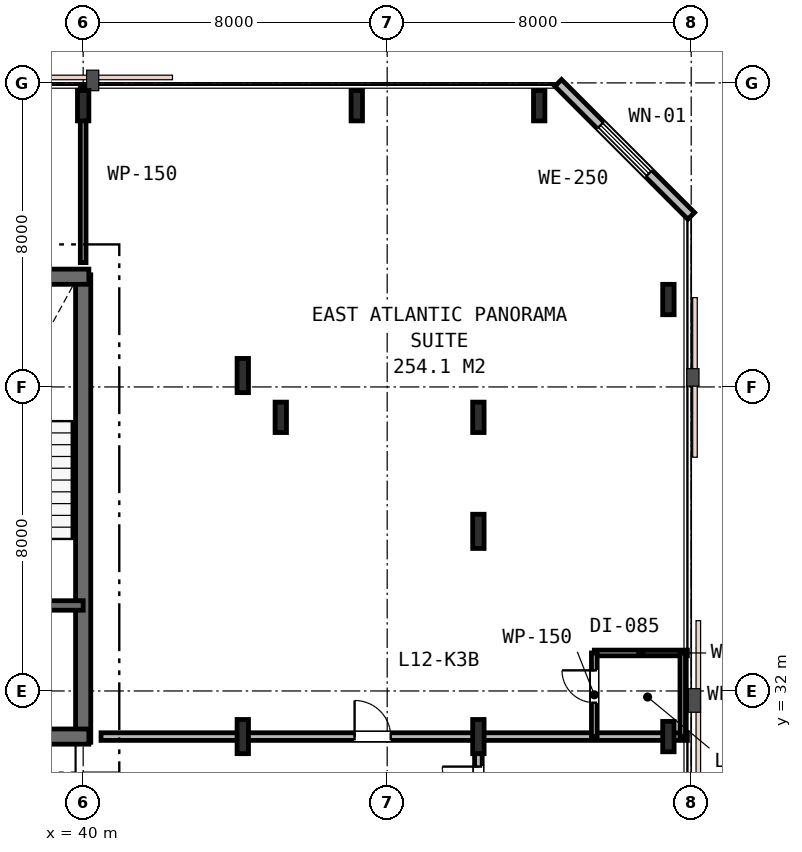
"""IFC4 building model, lengths in metres.
Left out: names, types, materials, properties, quantities, classifications, styles, units other than length and angle.
Written with IfcOpenShell. Run it as: python <this file> out.ifc"""

import sys

from ifc_helpers import new_model, si_unit, direction, frame, frame_2d, origin, origin_2d, place, context, subcontext, project, spatial, rectangle, i_section, extrude, element, fill, save


model = new_model("IFC4")
c1 = context("Model", 3, precision=1e-05, world=origin(), true_north=direction((0.0, 1.0)))
c2 = subcontext(c1, "Body", "Model", "MODEL_VIEW")
j1 = project(units=[si_unit("LENGTHUNIT", "METRE"), si_unit("PLANEANGLEUNIT", "RADIAN")], contexts=[c1])
p1 = place(None, origin())
s1 = spatial("IfcSite", under=j1, at=p1, CompositionType="ELEMENT")
p2 = place(p1, origin())
s2 = spatial("IfcBuilding", under=s1, at=p2, CompositionType="ELEMENT")
p3 = place(p2, frame((0.0, 0.0, 51.0)))
s3 = spatial("IfcBuildingStorey", under=s2, at=p3, CompositionType="ELEMENT", Elevation=51.0)
p4 = place(p3, frame((40.0, 30.65, 0.0), z_axis=(0.0, 0.0, 1.0), x_axis=(0.0, 1.0, 0.0)))
e1 = element("IfcWall", 1, at=p4, inside=s3, PredefinedType="SHEAR", context=c2, shape_type="SweptSolid", body=[
    extrude(rectangle(XDim=12.3, YDim=0.4, at=frame_2d((6.15, 0.0))), origin(), (0.0, 0.0, 1.0), 3.6),
])
p5 = place(p3, frame((15.85, 42.9, 0.0), z_axis=(0.0, 0.0, 1.0), x_axis=(1.0, 0.0, 0.0)))
e2 = element("IfcWall", 2, at=p5, inside=s3, PredefinedType="SHEAR", context=c2, shape_type="SweptSolid", body=[
    extrude(rectangle(XDim=24.3, YDim=0.4, at=frame_2d((12.15, 0.0))), origin(), (0.0, 0.0, 1.0), 3.6),
])
p6 = place(p3, frame((28.95, 30.8, 0.0), z_axis=(0.0, 0.0, 1.0), x_axis=(1.0, 0.0, 0.0)))
e3 = element("IfcWall", 3, at=p6, inside=s3, PredefinedType="SHEAR", context=c2, shape_type="SweptSolid", body=[
    extrude(rectangle(XDim=11.2, YDim=0.4, at=frame_2d((5.6, 0.0))), origin(), (0.0, 0.0, 1.0), 3.6),
])
p7 = place(p6, frame((7.65, 0.0, 0.0)))
e4 = element("IfcOpeningElement", 4, at=p7, cuts=e3, PredefinedType="OPENING", context=c2, shape_type="SweptSolid", body=[
    extrude(rectangle(XDim=1.1, YDim=2.15, at=frame_2d((0.55, 1.075))), frame((0.0, 0.21, 0.0), z_axis=(0.0, -1.0, 0.0), x_axis=(1.0, 0.0, 0.0)), (0.0, 0.0, 1.0), 0.42),
])
p8 = place(p3, frame((33.95, 34.25, 0.0), z_axis=(0.0, 0.0, 1.0), x_axis=(1.0, 0.0, 0.0)))
e5 = element("IfcWall", 5, at=p8, inside=s3, PredefinedType="SHEAR", context=c2, shape_type="SweptSolid", body=[
    extrude(rectangle(XDim=6.05, YDim=0.25, at=frame_2d((3.025, 0.0))), origin(), (0.0, 0.0, 1.0), 3.6),
])
p9 = place(p8, frame((3.7, 0.0, 0.0)))
e6 = element("IfcOpeningElement", 6, at=p9, cuts=e5, PredefinedType="OPENING", context=c2, shape_type="SweptSolid", body=[
    extrude(rectangle(XDim=1.0, YDim=2.15, at=frame_2d((0.5, 1.075))), frame((0.0, 0.135, 0.0), z_axis=(0.0, -1.0, 0.0), x_axis=(1.0, 0.0, 0.0)), (0.0, 0.0, 1.0), 0.27),
])
p10 = place(p8, frame((0.55, 0.0, 0.0)))
e7 = element("IfcOpeningElement", 7, at=p10, cuts=e5, PredefinedType="OPENING", context=c2, shape_type="SweptSolid", body=[
    extrude(rectangle(XDim=1.1, YDim=2.15, at=frame_2d((0.55, 1.075))), frame((0.0, 0.135, 0.0), z_axis=(0.0, -1.0, 0.0), x_axis=(1.0, 0.0, 0.0)), (0.0, 0.0, 1.0), 0.27),
])
for number, where, z_axis, x_axis in (
    (8, (45.2, 39.2, 0.0), (0.0, 0.0, 1.0), (1.0, 0.0, 0.0)),
    (9, (40.0, 47.4, 0.0), (0.0, 0.0, 1.0), (1.0, 0.0, 0.0)),
    (10, (47.2, 47.4, 0.0), (0.0, 0.0, 1.0), (1.0, 0.0, 0.0)),
    (11, (50.4, 39.2, 0.0), (0.0, 0.0, 1.0), (1.0, 0.0, 0.0)),
    (12, (55.4, 30.8, 0.0), (0.0, 0.0, 1.0), (1.0, 0.0, 0.0)),
    (13, (55.4, 42.3, 0.0), (0.0, 0.0, 1.0), (1.0, 0.0, 0.0)),
    (14, (52.0, 47.4, 0.0), (0.0, 0.0, 1.0), (1.0, 0.0, 0.0)),
):
    element("IfcColumn", number, at=place(p3, frame(where, z_axis=z_axis, x_axis=x_axis)), inside=s3, PredefinedType="COLUMN", context=c2, shape_type="SweptSolid", body=[
        extrude(i_section(OverallWidth=0.3, OverallDepth=0.8, WebThickness=0.018, FlangeThickness=0.033, FilletRadius=0.03, at=origin_2d()), origin(), (0.0, 0.0, 1.0), 3.6),
    ])
for number, where, z_axis, x_axis in (
    (15, (44.2, 30.8, 0.0), (0.0, 0.0, 1.0), (1.0, 0.0, 0.0)),
    (16, (44.2, 40.3, 0.0), (0.0, 0.0, 1.0), (1.0, 0.0, 0.0)),
    (17, (50.4, 30.8, 0.0), (0.0, 0.0, 1.0), (1.0, 0.0, 0.0)),
    (18, (50.4, 36.2, 0.0), (0.0, 0.0, 1.0), (1.0, 0.0, 0.0)),
):
    element("IfcColumn", number, at=place(p3, frame(where, z_axis=z_axis, x_axis=x_axis)), inside=s3, PredefinedType="COLUMN", context=c2, shape_type="SweptSolid", body=[
        extrude(i_section(OverallWidth=0.3, OverallDepth=0.9, WebThickness=0.018, FlangeThickness=0.035, FilletRadius=0.03, at=origin_2d()), origin(), (0.0, 0.0, 1.0), 3.6),
    ])
p11 = place(p3, frame((56.0, 44.5, 0.0), z_axis=(0.0, 0.0, 1.0), x_axis=(-0.707106781187, 0.707106781187, 0.0)))
e19 = element("IfcWall", 19, at=p11, inside=s3, PredefinedType="STANDARD", context=c2, shape_type="SweptSolid", body=[
    extrude(rectangle(XDim=4.95, YDim=0.25, at=frame_2d((2.475, 0.0))), origin(), (0.0, 0.0, 1.0), 3.33),
])
p12 = place(p11, frame((1.575, 0.0, 0.75)))
e20 = element("IfcOpeningElement", 20, at=p12, cuts=e19, PredefinedType="OPENING", context=c2, shape_type="SweptSolid", body=[
    extrude(rectangle(XDim=1.8, YDim=1.85, at=frame_2d((0.9, 0.925))), frame((0.0, 0.135, 0.0), z_axis=(0.0, -1.0, 0.0), x_axis=(1.0, 0.0, 0.0)), (0.0, 0.0, 1.0), 0.27),
])
p13 = place(p3, frame((40.0, 43.27, 0.0), z_axis=(0.0, 0.0, 1.0), x_axis=(0.0, 1.0, 0.0)))
e21 = element("IfcWall", 21, at=p13, inside=s3, PredefinedType="PARTITIONING", context=c2, shape_type="SweptSolid", body=[
    extrude(rectangle(XDim=4.63, YDim=0.15, at=frame_2d((2.315, 0.0))), origin(), (0.0, 0.0, 1.0), 2.93),
])
p14 = place(p3, frame((40.47, 30.8, 0.0), z_axis=(0.0, 0.0, 1.0), x_axis=(1.0, 0.0, 0.0)))
e22 = element("IfcWall", 22, at=p14, inside=s3, PredefinedType="PARTITIONING", context=c2, shape_type="SweptSolid", body=[
    extrude(rectangle(XDim=15.43, YDim=0.2, at=frame_2d((7.715, 0.0))), origin(), (0.0, 0.0, 1.0), 2.82),
])
p15 = place(p14, frame((6.673, 0.0, 0.0)))
e23 = element("IfcOpeningElement", 23, at=p15, cuts=e22, PredefinedType="OPENING", context=c2, shape_type="SweptSolid", body=[
    extrude(rectangle(XDim=0.95, YDim=2.15, at=frame_2d((0.475, 1.075))), frame((0.0, 0.11, 0.0), z_axis=(0.0, -1.0, 0.0), x_axis=(1.0, 0.0, 0.0)), (0.0, 0.0, 1.0), 0.22),
])
p16 = place(p3, frame((53.45, 33.0, 0.0), z_axis=(0.0, 0.0, 1.0), x_axis=(1.0, 0.0, 0.0)))
e24 = element("IfcWall", 24, at=p16, inside=s3, PredefinedType="PARTITIONING", context=c2, shape_type="SweptSolid", body=[
    extrude(rectangle(XDim=2.45, YDim=0.15, at=frame_2d((1.225, 0.0))), origin(), (0.0, 0.0, 1.0), 2.93),
])
p17 = place(p3, frame((53.45, 30.8, 0.0), z_axis=(0.0, 0.0, 1.0), x_axis=(0.0, 1.0, 0.0)))
e25 = element("IfcWall", 25, at=p17, inside=s3, PredefinedType="PARTITIONING", context=c2, shape_type="SweptSolid", body=[
    extrude(rectangle(XDim=2.2, YDim=0.15, at=frame_2d((1.1, 0.0))), origin(), (0.0, 0.0, 1.0), 2.82),
])
p18 = place(p17, frame((0.892, 0.0, 0.0)))
e26 = element("IfcOpeningElement", 26, at=p18, cuts=e25, PredefinedType="OPENING", context=c2, shape_type="SweptSolid", body=[
    extrude(rectangle(XDim=0.85, YDim=2.15, at=frame_2d((0.425, 1.075))), frame((0.0, 0.085, 0.0), z_axis=(0.0, -1.0, 0.0), x_axis=(1.0, 0.0, 0.0)), (0.0, 0.0, 1.0), 0.17),
])
p19 = place(p3, frame((55.78, 33.0, 0.0), z_axis=(0.0, 0.0, 1.0), x_axis=(0.0, -1.0, 0.0)))
e27 = element("IfcWall", 27, at=p19, inside=s3, PredefinedType="PARTITIONING", context=c2, shape_type="SweptSolid", body=[
    extrude(rectangle(XDim=2.2, YDim=0.15, at=frame_2d((1.1, 0.0))), origin(), (0.0, 0.0, 1.0), 2.82),
])
p20 = place(p3, frame((50.4, 28.6, 0.0), z_axis=(0.0, 0.0, 1.0), x_axis=(0.0, 1.0, 0.0)))
e28 = element("IfcWall", 28, at=p20, inside=s3, PredefinedType="PARTITIONING", context=c2, shape_type="SweptSolid", body=[
    extrude(rectangle(XDim=2.2, YDim=0.2, at=frame_2d((1.1, 0.0))), origin(), (0.0, 0.0, 1.0), 2.82),
])
p21 = place(p20, frame((0.46, 0.0, 0.0)))
e29 = element("IfcOpeningElement", 29, at=p21, cuts=e28, PredefinedType="OPENING", context=c2, shape_type="SweptSolid", body=[
    extrude(rectangle(XDim=0.95, YDim=2.15, at=frame_2d((0.475, 1.075))), frame((0.0, 0.11, 0.0), z_axis=(0.0, -1.0, 0.0), x_axis=(1.0, 0.0, 0.0)), (0.0, 0.0, 1.0), 0.22),
])
p22 = place(p12, origin())
e30 = element("IfcWindow", 30, at=p22, inside=s3, PartitioningType="SINGLE_PANEL", PredefinedType="WINDOW", context=c2, shape_type="SweptSolid", body=[
    extrude(rectangle(XDim=1.8, YDim=1.85, at=frame_2d((0.9, 0.925))), frame((0.0, 0.03, 0.0), z_axis=(0.0, -1.0, 0.0), x_axis=(1.0, 0.0, 0.0)), (0.0, 0.0, 1.0), 0.06),
])
fill(e20, e30)
p23 = place(p15, origin())
e31 = element("IfcDoor", 31, at=p23, inside=s3, OperationType="SINGLE_SWING_LEFT", PredefinedType="DOOR", context=c2, shape_type="SweptSolid", body=[
    extrude(rectangle(XDim=0.95, YDim=2.15, at=frame_2d((0.475, 1.075))), frame((0.0, 0.025, 0.0), z_axis=(0.0, -1.0, 0.0), x_axis=(1.0, 0.0, 0.0)), (0.0, 0.0, 1.0), 0.05),
])
fill(e23, e31)
p24 = place(p18, origin())
e32 = element("IfcDoor", 32, at=p24, inside=s3, OperationType="SINGLE_SWING_RIGHT", PredefinedType="DOOR", context=c2, shape_type="SweptSolid", body=[
    extrude(rectangle(XDim=0.85, YDim=2.15, at=frame_2d((0.425, 1.075))), frame((0.0, 0.025, 0.0), z_axis=(0.0, -1.0, 0.0), x_axis=(1.0, 0.0, 0.0)), (0.0, 0.0, 1.0), 0.05),
])
fill(e26, e32)
p25 = place(p21, origin())
e33 = element("IfcDoor", 33, at=p25, inside=s3, OperationType="SINGLE_SWING_RIGHT", PredefinedType="DOOR", context=c2, shape_type="SweptSolid", body=[
    extrude(rectangle(XDim=0.95, YDim=2.15, at=frame_2d((0.475, 1.075))), frame((0.0, 0.025, 0.0), z_axis=(0.0, -1.0, 0.0), x_axis=(1.0, 0.0, 0.0)), (0.0, 0.0, 1.0), 0.05),
])
fill(e29, e33)
save(model, sys.argv[1])
